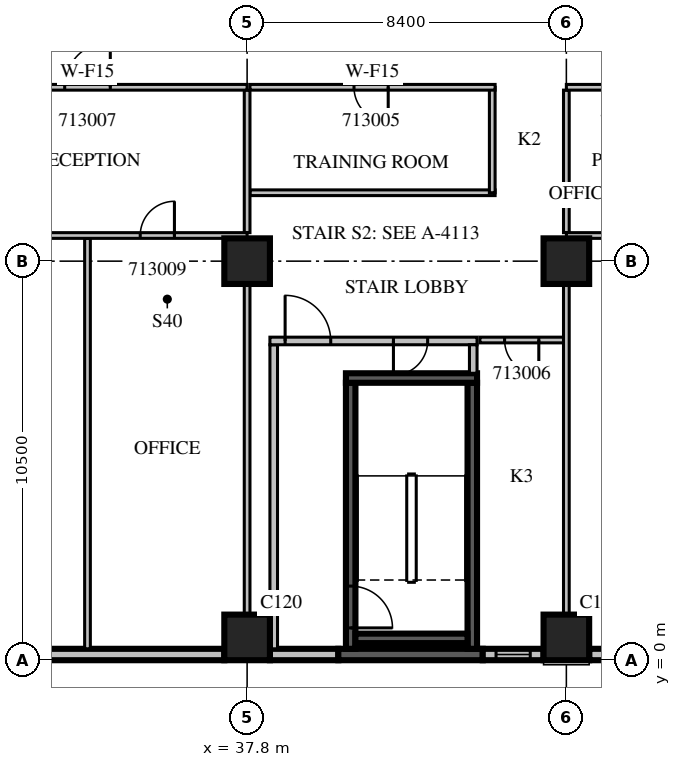
"""IFC4 building model, lengths in metres.
Left out: names, types, materials, properties, quantities, classifications, styles, units other than length and angle.
Written with IfcOpenShell. Run it as: python <this file> out.ifc"""

import sys

from ifc_helpers import new_model, si_unit, direction, frame, frame_2d, origin, origin_2d, place, context, subcontext, project, spatial, rectangle, extrude, source, transform, mapped, element, fill, save


model = new_model("IFC4")
c1 = context("Model", 3, precision=1e-05, world=origin(), true_north=direction((0.0, 1.0)))
c2 = subcontext(c1, "Body", "Model", "MODEL_VIEW")
j1 = project(units=[si_unit("LENGTHUNIT", "METRE"), si_unit("PLANEANGLEUNIT", "RADIAN")], contexts=[c1])
p1 = place(None, origin())
s1 = spatial("IfcSite", under=j1, at=p1, CompositionType="ELEMENT")
p2 = place(p1, origin())
s2 = spatial("IfcBuilding", under=s1, at=p2, CompositionType="ELEMENT")
p3 = place(p2, frame((0.0, 0.0, 65.7)))
s3 = spatial("IfcBuildingStorey", under=s2, at=p3, CompositionType="ELEMENT", Elevation=65.7)
m1 = source(origin(), c2, "Body", "SweptSolid", [
    extrude(rectangle(XDim=1.2, YDim=1.2, at=origin_2d()), origin(), (0.0, 0.0, 1.0), 4.2),
])
for number, where, z_axis, x_axis in (
    (1, (37.8, 0.6, 0.0), (0.0, 0.0, 1.0), (1.0, 0.0, 0.0)),
    (2, (46.2, 0.6, 0.0), (0.0, 0.0, 1.0), (1.0, 0.0, 0.0)),
    (3, (37.8, 10.5, 0.0), (0.0, 0.0, 1.0), (1.0, 0.0, 0.0)),
    (4, (46.2, 10.5, 0.0), (0.0, 0.0, 1.0), (1.0, 0.0, 0.0)),
):
    element("IfcColumn", number, at=place(p3, frame(where, z_axis=z_axis, x_axis=x_axis)), inside=s3, PredefinedType="COLUMN", context=c2, shape_type="MappedRepresentation", body=[
        mapped(m1, transform((0.0, 0.0, 0.0), scale=1.0)),
    ])
m2 = source(origin(), c2, "Body", "SweptSolid", [
    extrude(rectangle(XDim=7.2, YDim=0.3, at=frame_2d((3.6, 0.0))), origin(), (0.0, 0.0, 1.0), 3.8),
])
p4 = place(p3, frame((30.0, 0.15, 0.0), z_axis=(0.0, 0.0, 1.0), x_axis=(1.0, 0.0, 0.0)))
e5 = element("IfcWall", 5, at=p4, inside=s3, PredefinedType="STANDARD", context=c2, shape_type="MappedRepresentation", body=[
    mapped(m2, transform((0.0, 0.0, 0.0), scale=1.0)),
])
m3 = source(origin(), c2, "Body", "SweptSolid", [
    extrude(rectangle(XDim=1.8, YDim=0.3, at=frame_2d((0.9, 0.0))), origin(), (0.0, 0.0, 1.0), 3.8),
])
p5 = place(p3, frame((38.4, 0.15, 0.0), z_axis=(0.0, 0.0, 1.0), x_axis=(1.0, 0.0, 0.0)))
e6 = element("IfcWall", 6, at=p5, inside=s3, PredefinedType="STANDARD", context=c2, shape_type="MappedRepresentation", body=[
    mapped(m3, transform((0.0, 0.0, 0.0), scale=1.0)),
])
m4 = source(origin(), c2, "Body", "SweptSolid", [
    extrude(rectangle(XDim=3.8, YDim=0.3, at=frame_2d((1.9, 0.0))), origin(), (0.0, 0.0, 1.0), 3.8),
])
p6 = place(p3, frame((40.2, 0.15, 0.0), z_axis=(0.0, 0.0, 1.0), x_axis=(1.0, 0.0, 0.0)))
e7 = element("IfcWall", 7, at=p6, inside=s3, PredefinedType="SOLIDWALL", context=c2, shape_type="MappedRepresentation", body=[
    mapped(m4, transform((0.0, 0.0, 0.0), scale=1.0)),
])
m5 = source(origin(), c2, "Body", "SweptSolid", [
    extrude(rectangle(XDim=1.6, YDim=0.3, at=frame_2d((0.8, 0.0))), origin(), (0.0, 0.0, 1.0), 3.8),
])
p7 = place(p3, frame((44.0, 0.15, 0.0), z_axis=(0.0, 0.0, 1.0), x_axis=(1.0, 0.0, 0.0)))
e8 = element("IfcWall", 8, at=p7, inside=s3, PredefinedType="STANDARD", context=c2, shape_type="MappedRepresentation", body=[
    mapped(m5, transform((0.0, 0.0, 0.0), scale=1.0)),
])
m6 = source(origin(), c2, "Body", "SweptSolid", [
    extrude(rectangle(XDim=0.9, YDim=2.7, at=frame_2d((0.45, 1.35))), frame((0.0, 0.16, 0.0), z_axis=(0.0, -1.0, 0.0), x_axis=(1.0, 0.0, 0.0)), (0.0, 0.0, 1.0), 0.32),
])
p8 = place(p7, frame((0.35, 0.0, 0.6)))
e9 = element("IfcOpeningElement", 9, at=p8, cuts=e8, PredefinedType="OPENING", context=c2, shape_type="MappedRepresentation", body=[
    mapped(m6, transform((0.0, 0.0, 0.0), scale=1.0)),
])
m7 = source(origin(), c2, "Body", "SweptSolid", [
    extrude(rectangle(XDim=4.68, YDim=0.3, at=frame_2d((2.34, 0.0))), origin(), (0.0, 0.0, 1.0), 3.8),
])
p9 = place(p3, frame((46.8, 0.15, 0.0), z_axis=(0.0, 0.0, 1.0), x_axis=(1.0, 0.0, 0.0)))
e10 = element("IfcWall", 10, at=p9, inside=s3, PredefinedType="STANDARD", context=c2, shape_type="MappedRepresentation", body=[
    mapped(m7, transform((0.0, 0.0, 0.0), scale=1.0)),
])
m8 = source(origin(), c2, "Body", "SweptSolid", [
    extrude(rectangle(XDim=3.6, YDim=2.7, at=frame_2d((1.8, 1.35))), frame((0.0, 0.16, 0.0), z_axis=(0.0, -1.0, 0.0), x_axis=(1.0, 0.0, 0.0)), (0.0, 0.0, 1.0), 0.32),
])
p10 = place(p9, frame((0.54, 0.0, 0.6)))
e11 = element("IfcOpeningElement", 11, at=p10, cuts=e10, PredefinedType="OPENING", context=c2, shape_type="MappedRepresentation", body=[
    mapped(m8, transform((0.0, 0.0, 0.0), scale=1.0)),
])
m9 = source(origin(), c2, "Body", "SweptSolid", [
    extrude(rectangle(XDim=7.0, YDim=0.25, at=frame_2d((3.5, 0.0))), origin(), (0.0, 0.0, 1.0), 3.8),
])
p11 = place(p3, frame((40.525, 0.3, 0.0), z_axis=(0.0, 0.0, 1.0), x_axis=(0.0, 1.0, 0.0)))
e12 = element("IfcWall", 12, at=p11, inside=s3, PredefinedType="SOLIDWALL", context=c2, shape_type="MappedRepresentation", body=[
    mapped(m9, transform((0.0, 0.0, 0.0), scale=1.0)),
])
m10 = source(origin(), c2, "Body", "SweptSolid", [
    extrude(rectangle(XDim=1.1, YDim=2.1, at=frame_2d((0.55, 1.05))), frame((0.0, 0.135, 0.0), z_axis=(0.0, -1.0, 0.0), x_axis=(1.0, 0.0, 0.0)), (0.0, 0.0, 1.0), 0.27),
])
p12 = place(p11, frame((0.55, 0.0, 0.0)))
e13 = element("IfcOpeningElement", 13, at=p12, cuts=e12, PredefinedType="OPENING", context=c2, shape_type="MappedRepresentation", body=[
    mapped(m10, transform((0.0, 0.0, 0.0), scale=1.0)),
])
p13 = place(p3, frame((43.725, 0.3, 0.0), z_axis=(0.0, 0.0, 1.0), x_axis=(0.0, 1.0, 0.0)))
e14 = element("IfcWall", 14, at=p13, inside=s3, PredefinedType="SOLIDWALL", context=c2, shape_type="MappedRepresentation", body=[
    mapped(m9, transform((0.0, 0.0, 0.0), scale=1.0)),
])
m11 = source(origin(), c2, "Body", "SweptSolid", [
    extrude(rectangle(XDim=3.45, YDim=0.25, at=frame_2d((1.725, 0.0))), origin(), (0.0, 0.0, 1.0), 3.8),
])
p14 = place(p3, frame((40.4, 7.425, 0.0), z_axis=(0.0, 0.0, 1.0), x_axis=(1.0, 0.0, 0.0)))
e15 = element("IfcWall", 15, at=p14, inside=s3, PredefinedType="SOLIDWALL", context=c2, shape_type="MappedRepresentation", body=[
    mapped(m11, transform((0.0, 0.0, 0.0), scale=1.0)),
])
m12 = source(origin(), c2, "Body", "SweptSolid", [
    extrude(rectangle(XDim=2.95, YDim=0.25, at=frame_2d((1.475, 0.0))), origin(), (0.0, 0.0, 1.0), 3.8),
])
p15 = place(p3, frame((40.65, 0.575, 0.0), z_axis=(0.0, 0.0, 1.0), x_axis=(1.0, 0.0, 0.0)))
e16 = element("IfcWall", 16, at=p15, inside=s3, PredefinedType="SOLIDWALL", context=c2, shape_type="MappedRepresentation", body=[
    mapped(m12, transform((0.0, 0.0, 0.0), scale=1.0)),
])
m13 = source(origin(), c2, "Body", "SweptSolid", [
    extrude(rectangle(XDim=8.0, YDim=0.2, at=frame_2d((4.0, 0.0))), origin(), (0.0, 0.0, 1.0), 3.8),
])
p16 = place(p3, frame((38.5, 0.3, 0.0), z_axis=(0.0, 0.0, 1.0), x_axis=(0.0, 1.0, 0.0)))
e17 = element("IfcWall", 17, at=p16, inside=s3, PredefinedType="PARTITIONING", context=c2, shape_type="MappedRepresentation", body=[
    mapped(m13, transform((0.0, 0.0, 0.0), scale=1.0)),
])
m14 = source(origin(), c2, "Body", "SweptSolid", [
    extrude(rectangle(XDim=5.45, YDim=0.2, at=frame_2d((2.725, 0.0))), origin(), (0.0, 0.0, 1.0), 3.8),
])
p17 = place(p3, frame((38.4, 8.4, 0.0), z_axis=(0.0, 0.0, 1.0), x_axis=(1.0, 0.0, 0.0)))
e18 = element("IfcWall", 18, at=p17, inside=s3, PredefinedType="PARTITIONING", context=c2, shape_type="MappedRepresentation", body=[
    mapped(m14, transform((0.0, 0.0, 0.0), scale=1.0)),
])
m15 = source(origin(), c2, "Body", "SweptSolid", [
    extrude(rectangle(XDim=1.2, YDim=2.1, at=frame_2d((0.6, 1.05))), frame((0.0, 0.11, 0.0), z_axis=(0.0, -1.0, 0.0), x_axis=(1.0, 0.0, 0.0)), (0.0, 0.0, 1.0), 0.22),
])
p18 = place(p17, frame((0.4, 0.0, 0.0)))
e19 = element("IfcOpeningElement", 19, at=p18, cuts=e18, PredefinedType="OPENING", context=c2, shape_type="MappedRepresentation", body=[
    mapped(m15, transform((0.0, 0.0, 0.0), scale=1.0)),
])
m16 = source(origin(), c2, "Body", "SweptSolid", [
    extrude(rectangle(XDim=0.9, YDim=2.1, at=frame_2d((0.45, 1.05))), frame((0.0, 0.11, 0.0), z_axis=(0.0, -1.0, 0.0), x_axis=(1.0, 0.0, 0.0)), (0.0, 0.0, 1.0), 0.22),
])
p19 = place(p17, frame((3.25, 0.0, 0.0)))
e20 = element("IfcOpeningElement", 20, at=p19, cuts=e18, PredefinedType="OPENING", context=c2, shape_type="MappedRepresentation", body=[
    mapped(m16, transform((0.0, 0.0, 0.0), scale=1.0)),
])
m17 = source(origin(), c2, "Body", "SweptSolid", [
    extrude(rectangle(XDim=0.75, YDim=0.2, at=frame_2d((0.375, 0.0))), origin(), (0.0, 0.0, 1.0), 3.8),
])
p20 = place(p3, frame((43.75, 7.55, 0.0), z_axis=(0.0, 0.0, 1.0), x_axis=(0.0, 1.0, 0.0)))
e21 = element("IfcWall", 21, at=p20, inside=s3, PredefinedType="PARTITIONING", context=c2, shape_type="MappedRepresentation", body=[
    mapped(m17, transform((0.0, 0.0, 0.0), scale=1.0)),
])
m18 = source(origin(), c2, "Body", "SweptSolid", [
    extrude(rectangle(XDim=6.45, YDim=0.15, at=frame_2d((3.225, 0.0))), origin(), (0.0, 0.0, 1.0), 3.8),
])
p21 = place(p3, frame((37.875, 12.3, 0.0), z_axis=(0.0, 0.0, 1.0), x_axis=(1.0, 0.0, 0.0)))
e22 = element("IfcWall", 22, at=p21, inside=s3, PredefinedType="PARTITIONING", context=c2, shape_type="MappedRepresentation", body=[
    mapped(m18, transform((0.0, 0.0, 0.0), scale=1.0)),
])
p22 = place(p3, frame((44.25, 12.3, 0.0), z_axis=(0.0, 0.0, 1.0), x_axis=(0.0, 1.0, 0.0)))
e23 = element("IfcWall", 23, at=p22, inside=s3, PredefinedType="PARTITIONING", context=c2, shape_type="SweptSolid", body=[
    extrude(rectangle(XDim=2.775, YDim=0.15, at=frame_2d((1.387, 0.0))), origin(), (0.0, 0.0, 1.0), 3.8),
])
p23 = place(p3, frame((44.325, 15.075, 0.0), z_axis=(0.0, 0.0, 1.0), x_axis=(-1.0, 0.0, 0.0)))
e24 = element("IfcWall", 24, at=p23, inside=s3, PredefinedType="PARTITIONING", context=c2, shape_type="MappedRepresentation", body=[
    mapped(m18, transform((0.0, 0.0, 0.0), scale=1.0)),
])
m19 = source(origin(), c2, "Body", "SweptSolid", [
    extrude(rectangle(XDim=0.9, YDim=2.1, at=frame_2d((0.45, 1.05))), frame((0.0, 0.085, 0.0), z_axis=(0.0, -1.0, 0.0), x_axis=(1.0, 0.0, 0.0)), (0.0, 0.0, 1.0), 0.17),
])
p24 = place(p23, frame((2.812, 0.0, 0.0)))
e25 = element("IfcOpeningElement", 25, at=p24, cuts=e24, PredefinedType="OPENING", context=c2, shape_type="MappedRepresentation", body=[
    mapped(m19, transform((0.0, 0.0, 0.0), scale=1.0)),
])
m20 = source(origin(), c2, "Body", "SweptSolid", [
    extrude(rectangle(XDim=2.2, YDim=0.15, at=frame_2d((1.1, 0.0))), origin(), (0.0, 0.0, 1.0), 3.8),
])
p25 = place(p3, frame((46.125, 8.425, 0.0), z_axis=(0.0, 0.0, 1.0), x_axis=(-1.0, 0.0, 0.0)))
e26 = element("IfcWall", 26, at=p25, inside=s3, PredefinedType="PARTITIONING", context=c2, shape_type="MappedRepresentation", body=[
    mapped(m20, transform((0.0, 0.0, 0.0), scale=1.0)),
])
p26 = place(p25, frame((0.65, 0.0, 0.0)))
e27 = element("IfcOpeningElement", 27, at=p26, cuts=e26, PredefinedType="OPENING", context=c2, shape_type="MappedRepresentation", body=[
    mapped(m19, transform((0.0, 0.0, 0.0), scale=1.0)),
])
m21 = source(origin(), c2, "Body", "SweptSolid", [
    extrude(rectangle(XDim=10.8, YDim=0.15, at=frame_2d((5.4, 0.0))), origin(), (0.0, 0.0, 1.0), 3.8),
])
p27 = place(p3, frame((33.6, 0.3, 0.0), z_axis=(0.0, 0.0, 1.0), x_axis=(0.0, 1.0, 0.0)))
e28 = element("IfcWall", 28, at=p27, inside=s3, PredefinedType="PARTITIONING", context=c2, shape_type="MappedRepresentation", body=[
    mapped(m21, transform((0.0, 0.0, 0.0), scale=1.0)),
])
m22 = source(origin(), c2, "Body", "SweptSolid", [
    extrude(rectangle(XDim=8.702, YDim=0.15, at=frame_2d((4.351, 0.0))), origin(), (0.0, 0.0, 1.0), 3.8),
])
p28 = place(p3, frame((37.8, 1.199, 0.0), z_axis=(0.0, 0.0, 1.0), x_axis=(0.0, 1.0, 0.0)))
e29 = element("IfcWall", 29, at=p28, inside=s3, PredefinedType="PARTITIONING", context=c2, shape_type="MappedRepresentation", body=[
    mapped(m22, transform((0.0, 0.0, 0.0), scale=1.0)),
])
m23 = source(origin(), c2, "Body", "SweptSolid", [
    extrude(rectangle(XDim=3.75, YDim=0.15, at=frame_2d((1.875, 0.0))), origin(), (0.0, 0.0, 1.0), 3.8),
])
p29 = place(p3, frame((37.8, 11.25, 0.0), z_axis=(0.0, 0.0, 1.0), x_axis=(0.0, 1.0, 0.0)))
e30 = element("IfcWall", 30, at=p29, inside=s3, PredefinedType="PARTITIONING", context=c2, shape_type="MappedRepresentation", body=[
    mapped(m23, transform((0.0, 0.0, 0.0), scale=1.0)),
])
m24 = source(origin(), c2, "Body", "SweptSolid", [
    extrude(rectangle(XDim=8.4, YDim=0.15, at=frame_2d((4.2, 0.0))), origin(), (0.0, 0.0, 1.0), 3.8),
])
p30 = place(p3, frame((37.8, 11.175, 0.0), z_axis=(0.0, 0.0, 1.0), x_axis=(-1.0, 0.0, 0.0)))
e31 = element("IfcWall", 31, at=p30, inside=s3, PredefinedType="PARTITIONING", context=c2, shape_type="MappedRepresentation", body=[
    mapped(m24, transform((0.0, 0.0, 0.0), scale=1.0)),
])
p31 = place(p30, frame((5.537, 0.0, 0.0)))
e32 = element("IfcOpeningElement", 32, at=p31, cuts=e31, PredefinedType="OPENING", context=c2, shape_type="MappedRepresentation", body=[
    mapped(m19, transform((0.0, 0.0, 0.0), scale=1.0)),
])
p32 = place(p30, frame((1.913, 0.0, 0.0)))
e33 = element("IfcOpeningElement", 33, at=p32, cuts=e31, PredefinedType="OPENING", context=c2, shape_type="MappedRepresentation", body=[
    mapped(m19, transform((0.0, 0.0, 0.0), scale=1.0)),
])
p33 = place(p3, frame((46.2, 1.199, 0.0), z_axis=(0.0, 0.0, 1.0), x_axis=(0.0, 1.0, 0.0)))
e34 = element("IfcWall", 34, at=p33, inside=s3, PredefinedType="PARTITIONING", context=c2, shape_type="MappedRepresentation", body=[
    mapped(m22, transform((0.0, 0.0, 0.0), scale=1.0)),
])
p34 = place(p3, frame((46.2, 11.25, 0.0), z_axis=(0.0, 0.0, 1.0), x_axis=(0.0, 1.0, 0.0)))
e35 = element("IfcWall", 35, at=p34, inside=s3, PredefinedType="PARTITIONING", context=c2, shape_type="MappedRepresentation", body=[
    mapped(m23, transform((0.0, 0.0, 0.0), scale=1.0)),
])
m25 = source(origin(), c2, "Body", "SweptSolid", [
    extrude(rectangle(XDim=24.9, YDim=0.15, at=frame_2d((12.45, 0.0))), origin(), (0.0, 0.0, 1.0), 3.8),
])
p35 = place(p3, frame((71.1, 11.175, 0.0), z_axis=(0.0, 0.0, 1.0), x_axis=(-1.0, 0.0, 0.0)))
e36 = element("IfcWall", 36, at=p35, inside=s3, PredefinedType="PARTITIONING", context=c2, shape_type="MappedRepresentation", body=[
    mapped(m25, transform((0.0, 0.0, 0.0), scale=1.0)),
])
m26 = source(origin(), c2, "Body", "SweptSolid", [
    extrude(rectangle(XDim=1.1, YDim=2.1, at=frame_2d((0.55, 1.05))), frame((0.0, 0.085, 0.0), z_axis=(0.0, -1.0, 0.0), x_axis=(1.0, 0.0, 0.0)), (0.0, 0.0, 1.0), 0.17),
])
p36 = place(p35, frame((20.017, 0.0, 0.0)))
e37 = element("IfcOpeningElement", 37, at=p36, cuts=e36, PredefinedType="OPENING", context=c2, shape_type="MappedRepresentation", body=[
    mapped(m26, transform((0.0, 0.0, 0.0), scale=1.0)),
])
p37 = place(p35, frame((16.481, 0.0, 0.0)))
e38 = element("IfcOpeningElement", 38, at=p37, cuts=e36, PredefinedType="OPENING", context=c2, shape_type="MappedRepresentation", body=[
    mapped(m26, transform((0.0, 0.0, 0.0), scale=1.0)),
])
p38 = place(p35, frame((4.607, 0.0, 0.0)))
e39 = element("IfcOpeningElement", 39, at=p38, cuts=e36, PredefinedType="OPENING", context=c2, shape_type="MappedRepresentation", body=[
    mapped(m19, transform((0.0, 0.0, 0.0), scale=1.0)),
])
p39 = place(p35, frame((2.243, 0.0, 0.0)))
e40 = element("IfcOpeningElement", 40, at=p39, cuts=e36, PredefinedType="OPENING", context=c2, shape_type="MappedRepresentation", body=[
    mapped(m19, transform((0.0, 0.0, 0.0), scale=1.0)),
])
p40 = place(p3, frame((37.8, 15.075, 0.0), z_axis=(0.0, 0.0, 1.0), x_axis=(-1.0, 0.0, 0.0)))
e41 = element("IfcWall", 41, at=p40, inside=s3, PredefinedType="PARTITIONING", context=c2, shape_type="MappedRepresentation", body=[
    mapped(m24, transform((0.0, 0.0, 0.0), scale=1.0)),
])
m27 = source(origin(), c2, "Body", "SweptSolid", [
    extrude(rectangle(XDim=1.2, YDim=2.1, at=frame_2d((0.6, 1.05))), frame((0.0, 0.085, 0.0), z_axis=(0.0, -1.0, 0.0), x_axis=(1.0, 0.0, 0.0)), (0.0, 0.0, 1.0), 0.17),
])
p41 = place(p40, frame((3.6, 0.0, 0.0)))
e42 = element("IfcOpeningElement", 42, at=p41, cuts=e41, PredefinedType="OPENING", context=c2, shape_type="MappedRepresentation", body=[
    mapped(m27, transform((0.0, 0.0, 0.0), scale=1.0)),
])
p42 = place(p3, frame((71.1, 15.075, 0.0), z_axis=(0.0, 0.0, 1.0), x_axis=(-1.0, 0.0, 0.0)))
e43 = element("IfcWall", 43, at=p42, inside=s3, PredefinedType="PARTITIONING", context=c2, shape_type="MappedRepresentation", body=[
    mapped(m25, transform((0.0, 0.0, 0.0), scale=1.0)),
])
p43 = place(p42, frame((19.754, 0.0, 0.0)))
e44 = element("IfcOpeningElement", 44, at=p43, cuts=e43, PredefinedType="OPENING", context=c2, shape_type="MappedRepresentation", body=[
    mapped(m26, transform((0.0, 0.0, 0.0), scale=1.0)),
])
p44 = place(p42, frame((22.794, 0.0, 0.0)))
e45 = element("IfcOpeningElement", 45, at=p44, cuts=e43, PredefinedType="OPENING", context=c2, shape_type="MappedRepresentation", body=[
    mapped(m19, transform((0.0, 0.0, 0.0), scale=1.0)),
])
p45 = place(p42, frame((16.794, 0.0, 0.0)))
e46 = element("IfcOpeningElement", 46, at=p45, cuts=e43, PredefinedType="OPENING", context=c2, shape_type="MappedRepresentation", body=[
    mapped(m26, transform((0.0, 0.0, 0.0), scale=1.0)),
])
p46 = place(p42, frame((13.954, 0.0, 0.0)))
e47 = element("IfcOpeningElement", 47, at=p46, cuts=e43, PredefinedType="OPENING", context=c2, shape_type="MappedRepresentation", body=[
    mapped(m19, transform((0.0, 0.0, 0.0), scale=1.0)),
])
p47 = place(p42, frame((9.75, 0.0, 0.0)))
e48 = element("IfcOpeningElement", 48, at=p47, cuts=e43, PredefinedType="OPENING", context=c2, shape_type="MappedRepresentation", body=[
    mapped(m19, transform((0.0, 0.0, 0.0), scale=1.0)),
])
p48 = place(p42, frame((2.993, 0.0, 0.0)))
e49 = element("IfcOpeningElement", 49, at=p48, cuts=e43, PredefinedType="OPENING", context=c2, shape_type="MappedRepresentation", body=[
    mapped(m27, transform((0.0, 0.0, 0.0), scale=1.0)),
])
m28 = source(origin(), c2, "Body", "SweptSolid", [
    extrude(rectangle(XDim=0.9, YDim=2.7, at=frame_2d((0.45, 1.35))), frame((0.0, 0.03, 0.0), z_axis=(0.0, -1.0, 0.0), x_axis=(1.0, 0.0, 0.0)), (0.0, 0.0, 1.0), 0.06),
])
p49 = place(p8, origin())
e50 = element("IfcWindow", 50, at=p49, inside=s3, PartitioningType="SINGLE_PANEL", PredefinedType="WINDOW", context=c2, shape_type="MappedRepresentation", body=[
    mapped(m28, transform((0.0, 0.0, 0.0), scale=1.0)),
])
fill(e9, e50)
m29 = source(origin(), c2, "Body", "SweptSolid", [
    extrude(rectangle(XDim=1.1, YDim=2.1, at=frame_2d((0.55, 1.05))), frame((0.0, 0.025, 0.0), z_axis=(0.0, -1.0, 0.0), x_axis=(1.0, 0.0, 0.0)), (0.0, 0.0, 1.0), 0.05),
])
p50 = place(p12, origin())
e51 = element("IfcDoor", 51, at=p50, inside=s3, OperationType="SINGLE_SWING_RIGHT", PredefinedType="DOOR", context=c2, shape_type="MappedRepresentation", body=[
    mapped(m29, transform((0.0, 0.0, 0.0), scale=1.0)),
])
fill(e13, e51)
m30 = source(origin(), c2, "Body", "SweptSolid", [
    extrude(rectangle(XDim=1.2, YDim=2.1, at=frame_2d((0.6, 1.05))), frame((0.0, 0.025, 0.0), z_axis=(0.0, -1.0, 0.0), x_axis=(1.0, 0.0, 0.0)), (0.0, 0.0, 1.0), 0.05),
])
p51 = place(p18, origin())
e52 = element("IfcDoor", 52, at=p51, inside=s3, OperationType="SINGLE_SWING_LEFT", PredefinedType="DOOR", context=c2, shape_type="MappedRepresentation", body=[
    mapped(m30, transform((0.0, 0.0, 0.0), scale=1.0)),
])
fill(e19, e52)
m31 = source(origin(), c2, "Body", "SweptSolid", [
    extrude(rectangle(XDim=0.9, YDim=2.1, at=frame_2d((0.45, 1.05))), frame((0.0, 0.025, 0.0), z_axis=(0.0, -1.0, 0.0), x_axis=(1.0, 0.0, 0.0)), (0.0, 0.0, 1.0), 0.05),
])
p52 = place(p19, origin())
e53 = element("IfcDoor", 53, at=p52, inside=s3, OperationType="SINGLE_SWING_RIGHT", PredefinedType="DOOR", context=c2, shape_type="MappedRepresentation", body=[
    mapped(m31, transform((0.0, 0.0, 0.0), scale=1.0)),
])
fill(e20, e53)
p53 = place(p24, origin())
e54 = element("IfcDoor", 54, at=p53, inside=s3, OperationType="SINGLE_SWING_LEFT", PredefinedType="DOOR", context=c2, shape_type="MappedRepresentation", body=[
    mapped(m31, transform((0.0, 0.0, 0.0), scale=1.0)),
])
fill(e25, e54)
p54 = place(p26, origin())
e55 = element("IfcDoor", 55, at=p54, inside=s3, OperationType="SINGLE_SWING_LEFT", PredefinedType="DOOR", context=c2, shape_type="MappedRepresentation", body=[
    mapped(m31, transform((0.0, 0.0, 0.0), scale=1.0)),
])
fill(e27, e55)
p55 = place(p41, origin())
e56 = element("IfcDoor", 56, at=p55, inside=s3, OperationType="SINGLE_SWING_RIGHT", PredefinedType="DOOR", context=c2, shape_type="MappedRepresentation", body=[
    mapped(m30, transform((0.0, 0.0, 0.0), scale=1.0)),
])
fill(e42, e56)
p56 = place(p32, origin())
e57 = element("IfcDoor", 57, at=p56, inside=s3, OperationType="SINGLE_SWING_RIGHT", PredefinedType="DOOR", context=c2, shape_type="MappedRepresentation", body=[
    mapped(m31, transform((0.0, 0.0, 0.0), scale=1.0)),
])
fill(e33, e57)
save(model, sys.argv[1])
